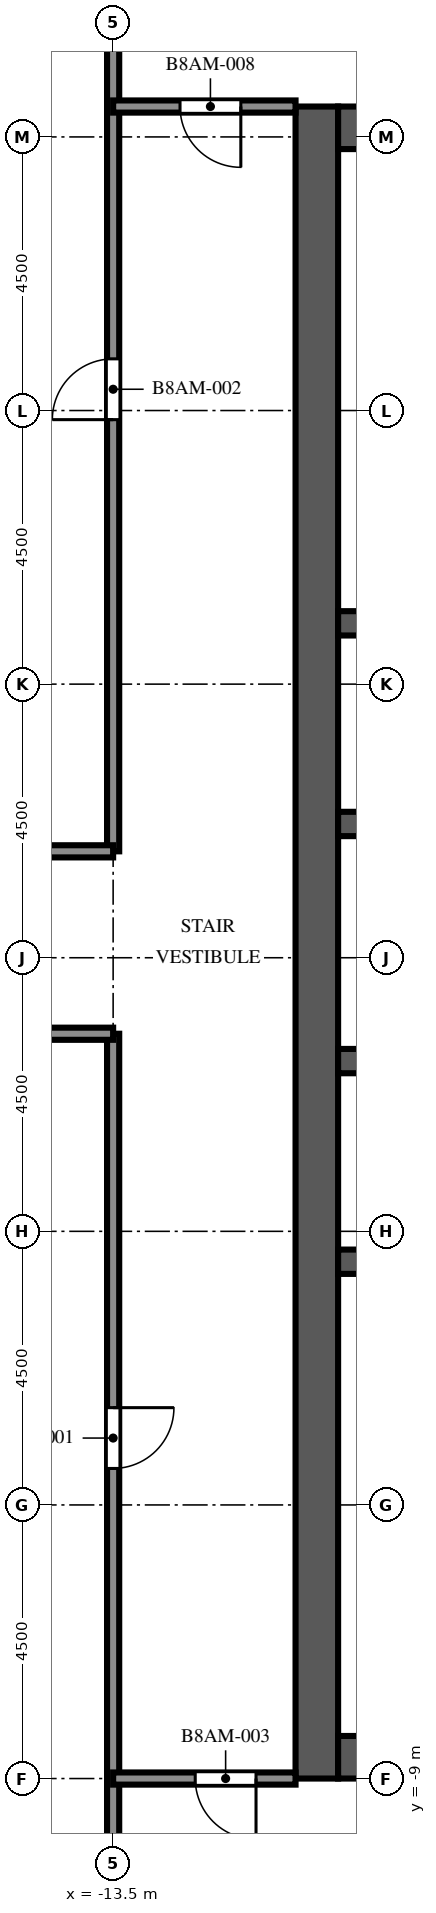
"""IFC4 building model, lengths in metres.
Left out: names, types, materials, properties, quantities, classifications, styles, units other than length and angle.
Written with IfcOpenShell. Run it as: python <this file> out.ifc"""

import sys

from ifc_helpers import new_model, si_unit, direction, frame, frame_2d, origin, place, context, subcontext, project, spatial, rectangle, extrude, element, fill, save


model = new_model("IFC4")
c1 = context("Model", 3, precision=1e-05, world=origin(), true_north=direction((0.0, 1.0)))
c2 = subcontext(c1, "Body", "Model", "MODEL_VIEW")
j1 = project(units=[si_unit("LENGTHUNIT", "METRE"), si_unit("PLANEANGLEUNIT", "RADIAN")], contexts=[c1])
p1 = place(None, origin())
s1 = spatial("IfcSite", under=j1, at=p1, CompositionType="ELEMENT")
p2 = place(p1, origin())
s2 = spatial("IfcBuilding", under=s1, at=p2, CompositionType="ELEMENT")
p3 = place(p2, frame((0.0, 0.0, 295.0)))
s3 = spatial("IfcBuildingStorey", under=s2, at=p3, CompositionType="ELEMENT", Elevation=295.0)
p4 = place(p3, frame((-10.15, -9.0, 0.0), z_axis=(0.0, 0.0, 1.0), x_axis=(0.0, 1.0, 0.0)))
e1 = element("IfcWall", 1, at=p4, inside=s3, PredefinedType="SHEAR", context=c2, shape_type="SweptSolid", body=[
    extrude(rectangle(XDim=27.5, YDim=0.7, at=frame_2d((13.75, 0.0))), origin(), (0.0, 0.0, 1.0), 6.0),
])
p5 = place(p4, frame((12.55, 0.0, 0.0)))
e2 = element("IfcOpeningElement", 2, at=p5, cuts=e1, PredefinedType="OPENING", context=c2, shape_type="SweptSolid", body=[
    extrude(rectangle(XDim=2.4, YDim=2.4, at=frame_2d((1.2, 1.2))), frame((0.0, 0.36, 0.0), z_axis=(0.0, -1.0, 0.0), x_axis=(1.0, 0.0, 0.0)), (0.0, 0.0, 1.0), 0.72),
])
p6 = place(p4, frame((6.825, 0.0, 0.0)))
e3 = element("IfcOpeningElement", 3, at=p6, cuts=e1, PredefinedType="OPENING", context=c2, shape_type="SweptSolid", body=[
    extrude(rectangle(XDim=1.2, YDim=2.1, at=frame_2d((0.6, 1.05))), frame((0.0, 0.36, 0.0), z_axis=(0.0, -1.0, 0.0), x_axis=(1.0, 0.0, 0.0)), (0.0, 0.0, 1.0), 0.72),
])
p7 = place(p4, frame((19.475, 0.0, 0.0)))
e4 = element("IfcOpeningElement", 4, at=p7, cuts=e1, PredefinedType="OPENING", context=c2, shape_type="SweptSolid", body=[
    extrude(rectangle(XDim=1.2, YDim=2.1, at=frame_2d((0.6, 1.05))), frame((0.0, 0.36, 0.0), z_axis=(0.0, -1.0, 0.0), x_axis=(1.0, 0.0, 0.0)), (0.0, 0.0, 1.0), 0.72),
])
for number, where, z_axis, x_axis in (
    (5, (-9.8, -8.65, 0.0), (0.0, 0.0, 1.0), (1.0, 0.0, 0.0)),
    (6, (-9.8, 18.15, 0.0), (0.0, 0.0, 1.0), (1.0, 0.0, 0.0)),
):
    element("IfcWall", number, at=place(p3, frame(where, z_axis=z_axis, x_axis=x_axis)), inside=s3, PredefinedType="SHEAR", context=c2, shape_type="SweptSolid", body=[
        extrude(rectangle(XDim=10.6, YDim=0.7, at=frame_2d((5.3, 0.0))), origin(), (0.0, 0.0, 1.0), 6.0),
    ])
p8 = place(p3, frame((-9.8, -0.5, 0.0), z_axis=(0.0, 0.0, 1.0), x_axis=(1.0, 0.0, 0.0)))
e7 = element("IfcWall", 7, at=p8, inside=s3, PredefinedType="SHEAR", context=c2, shape_type="SweptSolid", body=[
    extrude(rectangle(XDim=10.6, YDim=0.4, at=frame_2d((5.3, 0.0))), origin(), (0.0, 0.0, 1.0), 6.0),
])
p9 = place(p3, frame((-9.8, 2.8, 0.0), z_axis=(0.0, 0.0, 1.0), x_axis=(1.0, 0.0, 0.0)))
e8 = element("IfcWall", 8, at=p9, inside=s3, PredefinedType="SHEAR", context=c2, shape_type="SweptSolid", body=[
    extrude(rectangle(XDim=10.6, YDim=0.4, at=frame_2d((5.3, 0.0))), origin(), (0.0, 0.0, 1.0), 6.0),
])
p10 = place(p9, frame((0.688, 0.0, 0.0)))
e9 = element("IfcOpeningElement", 9, at=p10, cuts=e8, PredefinedType="OPENING", context=c2, shape_type="SweptSolid", body=[
    extrude(rectangle(XDim=1.1, YDim=2.1, at=frame_2d((0.55, 1.05))), frame((0.0, 0.21, 0.0), z_axis=(0.0, -1.0, 0.0), x_axis=(1.0, 0.0, 0.0)), (0.0, 0.0, 1.0), 0.42),
])
p11 = place(p9, frame((3.438, 0.0, 0.0)))
e10 = element("IfcOpeningElement", 10, at=p11, cuts=e8, PredefinedType="OPENING", context=c2, shape_type="SweptSolid", body=[
    extrude(rectangle(XDim=1.1, YDim=2.1, at=frame_2d((0.55, 1.05))), frame((0.0, 0.21, 0.0), z_axis=(0.0, -1.0, 0.0), x_axis=(1.0, 0.0, 0.0)), (0.0, 0.0, 1.0), 0.42),
])
p12 = place(p9, frame((6.113, 0.0, 0.0)))
e11 = element("IfcOpeningElement", 11, at=p12, cuts=e8, PredefinedType="OPENING", context=c2, shape_type="SweptSolid", body=[
    extrude(rectangle(XDim=1.0, YDim=2.1, at=frame_2d((0.5, 1.05))), frame((0.0, 0.21, 0.0), z_axis=(0.0, -1.0, 0.0), x_axis=(1.0, 0.0, 0.0)), (0.0, 0.0, 1.0), 0.42),
])
p13 = place(p9, frame((8.863, 0.0, 0.0)))
e12 = element("IfcOpeningElement", 12, at=p13, cuts=e8, PredefinedType="OPENING", context=c2, shape_type="SweptSolid", body=[
    extrude(rectangle(XDim=1.0, YDim=2.1, at=frame_2d((0.5, 1.05))), frame((0.0, 0.21, 0.0), z_axis=(0.0, -1.0, 0.0), x_axis=(1.0, 0.0, 0.0)), (0.0, 0.0, 1.0), 0.42),
])
p14 = place(p3, frame((-9.8, 6.7, 0.0), z_axis=(0.0, 0.0, 1.0), x_axis=(1.0, 0.0, 0.0)))
e13 = element("IfcWall", 13, at=p14, inside=s3, PredefinedType="SHEAR", context=c2, shape_type="SweptSolid", body=[
    extrude(rectangle(XDim=10.6, YDim=0.4, at=frame_2d((5.3, 0.0))), origin(), (0.0, 0.0, 1.0), 6.0),
])
p15 = place(p14, frame((3.438, 0.0, 0.0)))
e14 = element("IfcOpeningElement", 14, at=p15, cuts=e13, PredefinedType="OPENING", context=c2, shape_type="SweptSolid", body=[
    extrude(rectangle(XDim=1.1, YDim=2.1, at=frame_2d((0.55, 1.05))), frame((0.0, 0.21, 0.0), z_axis=(0.0, -1.0, 0.0), x_axis=(1.0, 0.0, 0.0)), (0.0, 0.0, 1.0), 0.42),
])
p16 = place(p14, frame((6.062, 0.0, 0.0)))
e15 = element("IfcOpeningElement", 15, at=p16, cuts=e13, PredefinedType="OPENING", context=c2, shape_type="SweptSolid", body=[
    extrude(rectangle(XDim=1.1, YDim=2.1, at=frame_2d((0.55, 1.05))), frame((0.0, 0.21, 0.0), z_axis=(0.0, -1.0, 0.0), x_axis=(1.0, 0.0, 0.0)), (0.0, 0.0, 1.0), 0.42),
])
p17 = place(p14, frame((8.812, 0.0, 0.0)))
e16 = element("IfcOpeningElement", 16, at=p17, cuts=e13, PredefinedType="OPENING", context=c2, shape_type="SweptSolid", body=[
    extrude(rectangle(XDim=1.1, YDim=2.1, at=frame_2d((0.55, 1.05))), frame((0.0, 0.21, 0.0), z_axis=(0.0, -1.0, 0.0), x_axis=(1.0, 0.0, 0.0)), (0.0, 0.0, 1.0), 0.42),
])
p18 = place(p14, frame((0.738, 0.0, 0.0)))
e17 = element("IfcOpeningElement", 17, at=p18, cuts=e13, PredefinedType="OPENING", context=c2, shape_type="SweptSolid", body=[
    extrude(rectangle(XDim=1.0, YDim=2.1, at=frame_2d((0.5, 1.05))), frame((0.0, 0.21, 0.0), z_axis=(0.0, -1.0, 0.0), x_axis=(1.0, 0.0, 0.0)), (0.0, 0.0, 1.0), 0.42),
])
p19 = place(p3, frame((-9.8, 10.0, 0.0), z_axis=(0.0, 0.0, 1.0), x_axis=(1.0, 0.0, 0.0)))
e18 = element("IfcWall", 18, at=p19, inside=s3, PredefinedType="SHEAR", context=c2, shape_type="SweptSolid", body=[
    extrude(rectangle(XDim=10.6, YDim=0.4, at=frame_2d((5.3, 0.0))), origin(), (0.0, 0.0, 1.0), 6.0),
])
p20 = place(p3, frame((-13.5, -13.05, 0.0), z_axis=(0.0, 0.0, 1.0), x_axis=(0.0, 1.0, 0.0)))
e19 = element("IfcWall", 19, at=p20, inside=s3, PredefinedType="PARTITIONING", context=c2, shape_type="SweptSolid", body=[
    extrude(rectangle(XDim=16.3, YDim=0.2, at=frame_2d((8.15, 0.0))), origin(), (0.0, 0.0, 1.0), 5.4),
])
p21 = place(p20, frame((9.15, 0.0, 0.0)))
e20 = element("IfcOpeningElement", 20, at=p21, cuts=e19, PredefinedType="OPENING", context=c2, shape_type="SweptSolid", body=[
    extrude(rectangle(XDim=1.0, YDim=2.1, at=frame_2d((0.5, 1.05))), frame((0.0, 0.11, 0.0), z_axis=(0.0, -1.0, 0.0), x_axis=(1.0, 0.0, 0.0)), (0.0, 0.0, 1.0), 0.22),
])
p22 = place(p3, frame((-13.5, 6.25, 0.0), z_axis=(0.0, 0.0, 1.0), x_axis=(0.0, 1.0, 0.0)))
e21 = element("IfcWall", 21, at=p22, inside=s3, PredefinedType="PARTITIONING", context=c2, shape_type="SweptSolid", body=[
    extrude(rectangle(XDim=15.8, YDim=0.2, at=frame_2d((7.9, 0.0))), origin(), (0.0, 0.0, 1.0), 5.4),
])
p23 = place(p22, frame((7.1, 0.0, 0.0)))
e22 = element("IfcOpeningElement", 22, at=p23, cuts=e21, PredefinedType="OPENING", context=c2, shape_type="SweptSolid", body=[
    extrude(rectangle(XDim=1.0, YDim=2.1, at=frame_2d((0.5, 1.05))), frame((0.0, 0.11, 0.0), z_axis=(0.0, -1.0, 0.0), x_axis=(1.0, 0.0, 0.0)), (0.0, 0.0, 1.0), 0.22),
])
p24 = place(p3, frame((-10.5, -9.0, 0.0), z_axis=(0.0, 0.0, 1.0), x_axis=(-1.0, 0.0, 0.0)))
e23 = element("IfcWall", 23, at=p24, inside=s3, PredefinedType="PARTITIONING", context=c2, shape_type="SweptSolid", body=[
    extrude(rectangle(XDim=3.0, YDim=0.2, at=frame_2d((1.5, 0.0))), origin(), (0.0, 0.0, 1.0), 5.4),
])
p25 = place(p24, frame((0.65, 0.0, 0.0)))
e24 = element("IfcOpeningElement", 24, at=p25, cuts=e23, PredefinedType="OPENING", context=c2, shape_type="SweptSolid", body=[
    extrude(rectangle(XDim=1.0, YDim=2.1, at=frame_2d((0.5, 1.05))), frame((0.0, 0.11, 0.0), z_axis=(0.0, -1.0, 0.0), x_axis=(1.0, 0.0, 0.0)), (0.0, 0.0, 1.0), 0.22),
])
for number, where, z_axis, x_axis in (
    (25, (-17.55, 3.25, 0.0), (0.0, 0.0, 1.0), (1.0, 0.0, 0.0)),
    (26, (-17.55, 6.25, 0.0), (0.0, 0.0, 1.0), (1.0, 0.0, 0.0)),
):
    element("IfcWall", number, at=place(p3, frame(where, z_axis=z_axis, x_axis=x_axis)), inside=s3, PredefinedType="PARTITIONING", context=c2, shape_type="SweptSolid", body=[
        extrude(rectangle(XDim=4.05, YDim=0.2, at=frame_2d((2.025, 0.0))), origin(), (0.0, 0.0, 1.0), 5.4),
    ])
p26 = place(p3, frame((-13.5, 18.5, 0.0), z_axis=(0.0, 0.0, 1.0), x_axis=(1.0, 0.0, 0.0)))
e27 = element("IfcWall", 27, at=p26, inside=s3, PredefinedType="PARTITIONING", context=c2, shape_type="SweptSolid", body=[
    extrude(rectangle(XDim=3.0, YDim=0.2, at=frame_2d((1.5, 0.0))), origin(), (0.0, 0.0, 1.0), 5.4),
])
p27 = place(p26, frame((1.1, 0.0, 0.0)))
e28 = element("IfcOpeningElement", 28, at=p27, cuts=e27, PredefinedType="OPENING", context=c2, shape_type="SweptSolid", body=[
    extrude(rectangle(XDim=1.0, YDim=2.1, at=frame_2d((0.5, 1.05))), frame((0.0, 0.11, 0.0), z_axis=(0.0, -1.0, 0.0), x_axis=(1.0, 0.0, 0.0)), (0.0, 0.0, 1.0), 0.22),
])
p28 = place(p5, origin())
e29 = element("IfcDoor", 29, at=p28, inside=s3, OperationType="DOUBLE_DOOR_DOUBLE_SWING", PredefinedType="DOOR", context=c2, shape_type="SweptSolid", body=[
    extrude(rectangle(XDim=2.4, YDim=2.4, at=frame_2d((1.2, 1.2))), frame((0.0, 0.025, 0.0), z_axis=(0.0, -1.0, 0.0), x_axis=(1.0, 0.0, 0.0)), (0.0, 0.0, 1.0), 0.05),
])
fill(e2, e29)
p29 = place(p6, origin())
e30 = element("IfcDoor", 30, at=p29, inside=s3, OperationType="SINGLE_SWING_LEFT", PredefinedType="DOOR", context=c2, shape_type="SweptSolid", body=[
    extrude(rectangle(XDim=1.2, YDim=2.1, at=frame_2d((0.6, 1.05))), frame((0.0, 0.025, 0.0), z_axis=(0.0, -1.0, 0.0), x_axis=(1.0, 0.0, 0.0)), (0.0, 0.0, 1.0), 0.05),
])
fill(e3, e30)
p30 = place(p7, origin())
e31 = element("IfcDoor", 31, at=p30, inside=s3, OperationType="SINGLE_SWING_LEFT", PredefinedType="DOOR", context=c2, shape_type="SweptSolid", body=[
    extrude(rectangle(XDim=1.2, YDim=2.1, at=frame_2d((0.6, 1.05))), frame((0.0, 0.025, 0.0), z_axis=(0.0, -1.0, 0.0), x_axis=(1.0, 0.0, 0.0)), (0.0, 0.0, 1.0), 0.05),
])
fill(e4, e31)
p31 = place(p21, origin())
e32 = element("IfcDoor", 32, at=p31, inside=s3, OperationType="SINGLE_SWING_RIGHT", PredefinedType="DOOR", context=c2, shape_type="SweptSolid", body=[
    extrude(rectangle(XDim=1.0, YDim=2.1, at=frame_2d((0.5, 1.05))), frame((0.0, 0.025, 0.0), z_axis=(0.0, -1.0, 0.0), x_axis=(1.0, 0.0, 0.0)), (0.0, 0.0, 1.0), 0.05),
])
fill(e20, e32)
p32 = place(p23, origin())
e33 = element("IfcDoor", 33, at=p32, inside=s3, OperationType="SINGLE_SWING_LEFT", PredefinedType="DOOR", context=c2, shape_type="SweptSolid", body=[
    extrude(rectangle(XDim=1.0, YDim=2.1, at=frame_2d((0.5, 1.05))), frame((0.0, 0.025, 0.0), z_axis=(0.0, -1.0, 0.0), x_axis=(1.0, 0.0, 0.0)), (0.0, 0.0, 1.0), 0.05),
])
fill(e22, e33)
p33 = place(p25, origin())
e34 = element("IfcDoor", 34, at=p33, inside=s3, OperationType="SINGLE_SWING_LEFT", PredefinedType="DOOR", context=c2, shape_type="SweptSolid", body=[
    extrude(rectangle(XDim=1.0, YDim=2.1, at=frame_2d((0.5, 1.05))), frame((0.0, 0.025, 0.0), z_axis=(0.0, -1.0, 0.0), x_axis=(1.0, 0.0, 0.0)), (0.0, 0.0, 1.0), 0.05),
])
fill(e24, e34)
p34 = place(p27, origin())
e35 = element("IfcDoor", 35, at=p34, inside=s3, OperationType="SINGLE_SWING_RIGHT", PredefinedType="DOOR", context=c2, shape_type="SweptSolid", body=[
    extrude(rectangle(XDim=1.0, YDim=2.1, at=frame_2d((0.5, 1.05))), frame((0.0, 0.025, 0.0), z_axis=(0.0, -1.0, 0.0), x_axis=(1.0, 0.0, 0.0)), (0.0, 0.0, 1.0), 0.05),
])
fill(e28, e35)
save(model, sys.argv[1])
